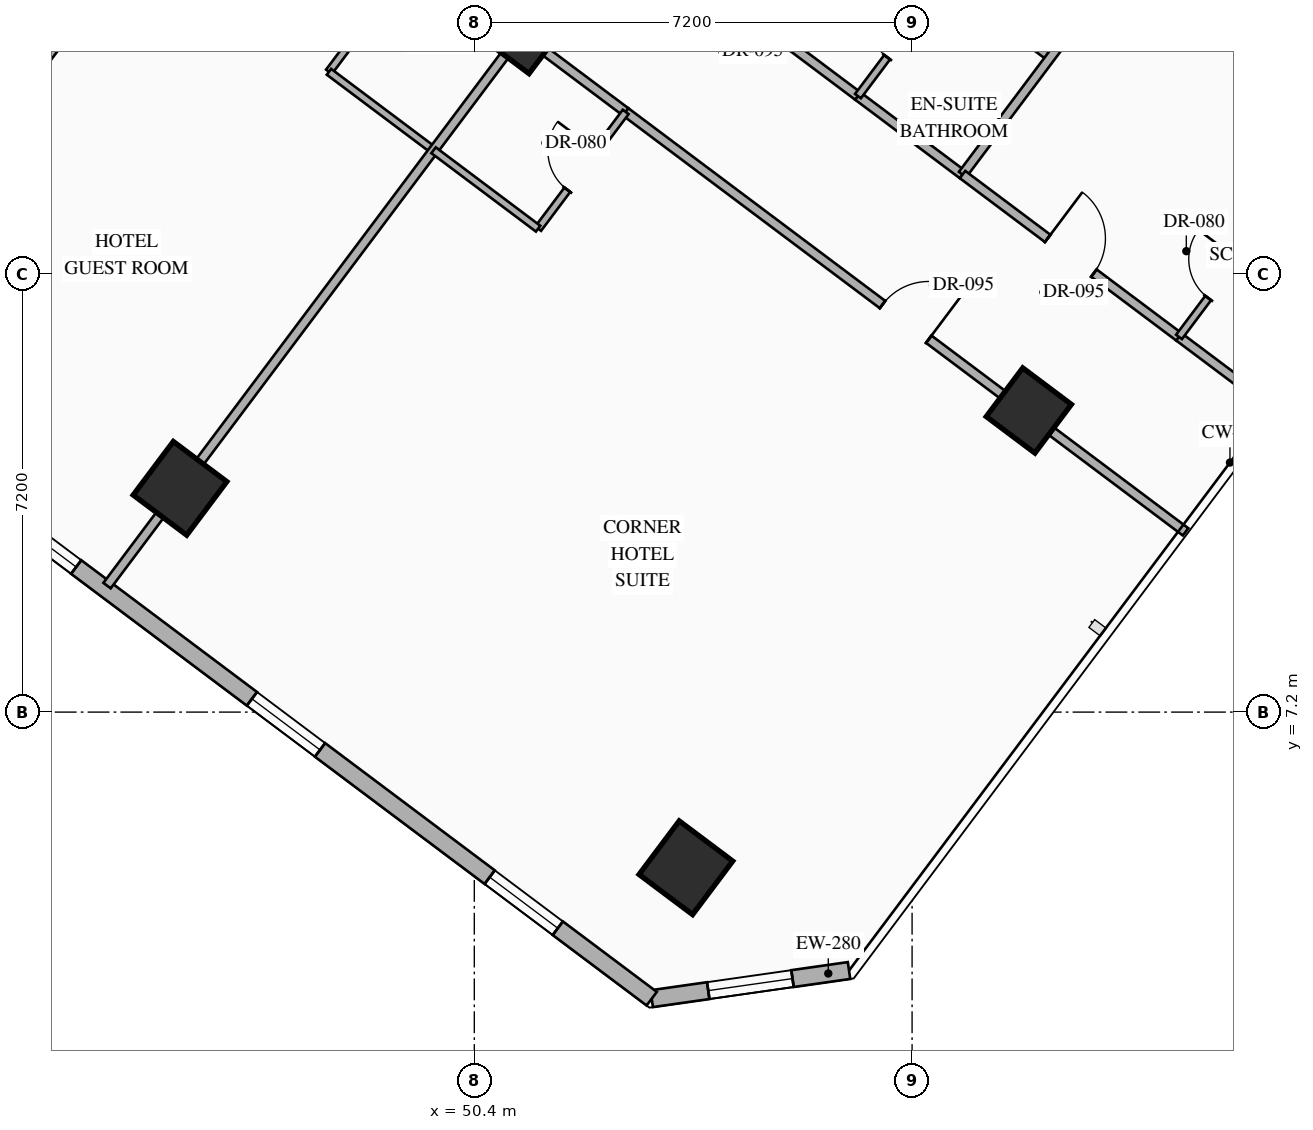
"""IFC4 building model, lengths in metres.
Left out: names, types, materials, properties, quantities, classifications, styles, units other than length and angle.
Written with IfcOpenShell. Run it as: python <this file> out.ifc"""

import sys

from ifc_helpers import new_model, si_unit, direction, frame, frame_2d, origin, origin_2d, place, context, subcontext, project, spatial, rectangle, hollow_rectangle, extrude, element, fill, save


model = new_model("IFC4")
c1 = context("Model", 3, precision=1e-05, world=origin(), true_north=direction((0.0, 1.0)))
c2 = subcontext(c1, "Body", "Model", "MODEL_VIEW")
j1 = project(units=[si_unit("LENGTHUNIT", "METRE"), si_unit("PLANEANGLEUNIT", "RADIAN")], contexts=[c1])
p1 = place(None, origin())
s1 = spatial("IfcSite", under=j1, at=p1, CompositionType="ELEMENT")
p2 = place(p1, origin())
s2 = spatial("IfcBuilding", under=s1, at=p2, CompositionType="ELEMENT")
p3 = place(p2, frame((0.0, 0.0, 39.95)))
s3 = spatial("IfcBuildingStorey", under=s2, at=p3, CompositionType="ELEMENT", Elevation=39.95)
p4 = place(p3, frame((45.56, 10.88, 0.0), z_axis=(0.0, 0.0, 1.0), x_axis=(0.799999996291, -0.600000004945, 0.0)))
e1 = element("IfcColumn", 1, at=p4, inside=s3, PredefinedType="COLUMN", context=c2, shape_type="SweptSolid", body=[
    extrude(hollow_rectangle(XDim=1.1, YDim=1.1, WallThickness=0.04, at=origin_2d()), origin(), (0.0, 0.0, 1.0), 3.35),
])
p5 = place(p3, frame((51.2, 18.4, 0.0), z_axis=(0.0, 0.0, 1.0), x_axis=(0.799999996291, -0.600000004945, 0.0)))
e2 = element("IfcColumn", 2, at=p5, inside=s3, PredefinedType="COLUMN", context=c2, shape_type="SweptSolid", body=[
    extrude(hollow_rectangle(XDim=1.0, YDim=1.0, WallThickness=0.038, at=origin_2d()), origin(), (0.0, 0.0, 1.0), 3.35),
])
p6 = place(p3, frame((53.88, 4.64, 0.0), z_axis=(0.0, 0.0, 1.0), x_axis=(0.799999996291, -0.600000004945, 0.0)))
e3 = element("IfcColumn", 3, at=p6, inside=s3, PredefinedType="COLUMN", context=c2, shape_type="SweptSolid", body=[
    extrude(hollow_rectangle(XDim=1.1, YDim=1.1, WallThickness=0.04, at=origin_2d()), origin(), (0.0, 0.0, 1.0), 3.35),
])
p7 = place(p3, frame((59.52, 12.16, 0.0), z_axis=(0.0, 0.0, 1.0), x_axis=(0.799999996291, -0.600000004945, 0.0)))
e4 = element("IfcColumn", 4, at=p7, inside=s3, PredefinedType="COLUMN", context=c2, shape_type="SweptSolid", body=[
    extrude(hollow_rectangle(XDim=1.0, YDim=1.0, WallThickness=0.038, at=origin_2d()), origin(), (0.0, 0.0, 1.0), 3.35),
])
p8 = place(p3, frame((56.563, 2.95, 0.0), z_axis=(0.0, 0.0, 1.0), x_axis=(-0.989977778067, -0.141223223777, 0.0)))
e5 = element("IfcWall", 5, at=p8, inside=s3, PredefinedType="STANDARD", context=c2, shape_type="SweptSolid", body=[
    extrude(rectangle(XDim=3.278, YDim=0.28, at=frame_2d((1.639, 0.0))), origin(), (0.0, 0.0, 1.0), 3.13),
])
p9 = place(p8, frame((0.939, 0.0, 0.85)))
e6 = element("IfcOpeningElement", 6, at=p9, cuts=e5, PredefinedType="OPENING", context=c2, shape_type="SweptSolid", body=[
    extrude(rectangle(XDim=1.4, YDim=1.8, at=frame_2d((0.7, 0.9))), frame((0.0, 0.15, 0.0), z_axis=(0.0, -1.0, 0.0), x_axis=(1.0, 0.0, 0.0)), (0.0, 0.0, 1.0), 0.3),
])
p10 = place(p3, frame((53.318, 2.487, 0.0), z_axis=(0.0, 0.0, 1.0), x_axis=(-0.800004174678, 0.599994433723, 0.0)))
e7 = element("IfcWall", 7, at=p10, inside=s3, PredefinedType="STANDARD", context=c2, shape_type="SweptSolid", body=[
    extrude(rectangle(XDim=35.089, YDim=0.28, at=frame_2d((17.544, 0.0))), origin(), (0.0, 0.0, 1.0), 3.13),
])
p11 = place(p10, frame((1.931, 0.0, 0.85)))
e8 = element("IfcOpeningElement", 8, at=p11, cuts=e7, PredefinedType="OPENING", context=c2, shape_type="SweptSolid", body=[
    extrude(rectangle(XDim=1.4, YDim=1.8, at=frame_2d((0.7, 0.9))), frame((0.0, 0.15, 0.0), z_axis=(0.0, -1.0, 0.0), x_axis=(1.0, 0.0, 0.0)), (0.0, 0.0, 1.0), 0.3),
])
p12 = place(p10, frame((6.819, 0.0, 0.85)))
e9 = element("IfcOpeningElement", 9, at=p12, cuts=e7, PredefinedType="OPENING", context=c2, shape_type="SweptSolid", body=[
    extrude(rectangle(XDim=1.4, YDim=1.8, at=frame_2d((0.7, 0.9))), frame((0.0, 0.15, 0.0), z_axis=(0.0, -1.0, 0.0), x_axis=(1.0, 0.0, 0.0)), (0.0, 0.0, 1.0), 0.3),
])
p13 = place(p10, frame((11.832, 0.0, 0.85)))
e10 = element("IfcOpeningElement", 10, at=p13, cuts=e7, PredefinedType="OPENING", context=c2, shape_type="SweptSolid", body=[
    extrude(rectangle(XDim=1.4, YDim=1.8, at=frame_2d((0.7, 0.9))), frame((0.0, 0.15, 0.0), z_axis=(0.0, -1.0, 0.0), x_axis=(1.0, 0.0, 0.0)), (0.0, 0.0, 1.0), 0.3),
])
p14 = place(p10, frame((17.647, 0.0, 0.85)))
e11 = element("IfcOpeningElement", 11, at=p14, cuts=e7, PredefinedType="OPENING", context=c2, shape_type="SweptSolid", body=[
    extrude(rectangle(XDim=1.4, YDim=1.8, at=frame_2d((0.7, 0.9))), frame((0.0, 0.15, 0.0), z_axis=(0.0, -1.0, 0.0), x_axis=(1.0, 0.0, 0.0)), (0.0, 0.0, 1.0), 0.3),
])
p15 = place(p10, frame((21.857, 0.0, 0.85)))
e12 = element("IfcOpeningElement", 12, at=p15, cuts=e7, PredefinedType="OPENING", context=c2, shape_type="SweptSolid", body=[
    extrude(rectangle(XDim=1.4, YDim=1.8, at=frame_2d((0.7, 0.9))), frame((0.0, 0.15, 0.0), z_axis=(0.0, -1.0, 0.0), x_axis=(1.0, 0.0, 0.0)), (0.0, 0.0, 1.0), 0.3),
])
p16 = place(p10, frame((26.87, 0.0, 0.85)))
e13 = element("IfcOpeningElement", 13, at=p16, cuts=e7, PredefinedType="OPENING", context=c2, shape_type="SweptSolid", body=[
    extrude(rectangle(XDim=1.4, YDim=1.8, at=frame_2d((0.7, 0.9))), frame((0.0, 0.15, 0.0), z_axis=(0.0, -1.0, 0.0), x_axis=(1.0, 0.0, 0.0)), (0.0, 0.0, 1.0), 0.3),
])
p17 = place(p10, frame((31.757, 0.0, 0.85)))
e14 = element("IfcOpeningElement", 14, at=p17, cuts=e7, PredefinedType="OPENING", context=c2, shape_type="SweptSolid", body=[
    extrude(rectangle(XDim=1.4, YDim=1.8, at=frame_2d((0.7, 0.9))), frame((0.0, 0.15, 0.0), z_axis=(0.0, -1.0, 0.0), x_axis=(1.0, 0.0, 0.0)), (0.0, 0.0, 1.0), 0.3),
])
p18 = place(p3, frame((39.464, 12.752, 0.0), z_axis=(0.0, 0.0, 1.0), x_axis=(0.6, 0.8, 0.0)))
e15 = element("IfcWall", 15, at=p18, inside=s3, PredefinedType="PARTITIONING", context=c2, shape_type="SweptSolid", body=[
    extrude(rectangle(XDim=11.51, YDim=0.15, at=frame_2d((5.755, 0.0))), origin(), (0.0, 0.0, 1.0), 3.13),
])
p19 = place(p3, frame((53.15, 20.0, 0.0), z_axis=(0.0, 0.0, 1.0), x_axis=(0.800013166942, -0.599982443676, 0.0)))
e16 = element("IfcWall", 16, at=p19, inside=s3, PredefinedType="PARTITIONING", context=c2, shape_type="SweptSolid", body=[
    extrude(rectangle(XDim=4.45, YDim=0.15, at=frame_2d((2.225, 0.0))), origin(), (0.0, 0.0, 1.0), 2.775),
])
p20 = place(p19, frame((1.75, 0.0, 0.0)))
e17 = element("IfcOpeningElement", 17, at=p20, cuts=e16, PredefinedType="OPENING", context=c2, shape_type="SweptSolid", body=[
    extrude(rectangle(XDim=0.95, YDim=2.15, at=frame_2d((0.475, 1.075))), frame((0.0, 0.085, 0.0), z_axis=(0.0, -1.0, 0.0), x_axis=(1.0, 0.0, 0.0)), (0.0, 0.0, 1.0), 0.17),
])
p21 = place(p3, frame((56.71, 17.33, 0.0), z_axis=(0.0, 0.0, 1.0), x_axis=(0.79998637334, -0.60001816845, 0.0)))
e18 = element("IfcWall", 18, at=p21, inside=s3, PredefinedType="PARTITIONING", context=c2, shape_type="SweptSolid", body=[
    extrude(rectangle(XDim=2.15, YDim=0.15, at=frame_2d((1.075, 0.0))), origin(), (0.0, 0.0, 1.0), 2.775),
])
p22 = place(p3, frame((56.71, 17.33, 0.0), z_axis=(0.0, 0.0, 1.0), x_axis=(0.6, 0.8, 0.0)))
e19 = element("IfcWall", 19, at=p22, inside=s3, PredefinedType="PARTITIONING", context=c2, shape_type="SweptSolid", body=[
    extrude(rectangle(XDim=2.4, YDim=0.12, at=frame_2d((1.2, 0.0))), origin(), (0.0, 0.0, 1.0), 3.13),
])
p23 = place(p22, frame((0.8, 0.0, 0.0)))
e20 = element("IfcOpeningElement", 20, at=p23, cuts=e19, PredefinedType="OPENING", context=c2, shape_type="SweptSolid", body=[
    extrude(rectangle(XDim=0.8, YDim=2.06, at=frame_2d((0.4, 1.03))), frame((0.0, 0.07, 0.0), z_axis=(0.0, -1.0, 0.0), x_axis=(1.0, 0.0, 0.0)), (0.0, 0.0, 1.0), 0.14),
])
p24 = place(p3, frame((58.15, 19.25, 0.0), z_axis=(0.0, 0.0, 1.0), x_axis=(0.800027249606, -0.599963665473, 0.0)))
e21 = element("IfcWall", 21, at=p24, inside=s3, PredefinedType="PARTITIONING", context=c2, shape_type="SweptSolid", body=[
    extrude(rectangle(XDim=2.15, YDim=0.12, at=frame_2d((1.075, 0.0))), origin(), (0.0, 0.0, 1.0), 3.13),
])
p25 = place(p3, frame((58.43, 16.04, 0.0), z_axis=(0.0, 0.0, 1.0), x_axis=(0.60001014597, 0.799992390422, 0.0)))
e22 = element("IfcWall", 22, at=p25, inside=s3, PredefinedType="PARTITIONING", context=c2, shape_type="SweptSolid", body=[
    extrude(rectangle(XDim=11.55, YDim=0.15, at=frame_2d((5.775, 0.0))), origin(), (0.0, 0.0, 1.0), 3.13),
])
p26 = place(p3, frame((58.43, 16.04, 0.0), z_axis=(0.0, 0.0, 1.0), x_axis=(0.800013166942, -0.599982443676, 0.0)))
e23 = element("IfcWall", 23, at=p26, inside=s3, PredefinedType="PARTITIONING", context=c2, shape_type="SweptSolid", body=[
    extrude(rectangle(XDim=4.45, YDim=0.15, at=frame_2d((2.225, 0.0))), origin(), (0.0, 0.0, 1.0), 2.775),
])
p27 = place(p26, frame((1.75, 0.0, 0.0)))
e24 = element("IfcOpeningElement", 24, at=p27, cuts=e23, PredefinedType="OPENING", context=c2, shape_type="SweptSolid", body=[
    extrude(rectangle(XDim=0.95, YDim=2.15, at=frame_2d((0.475, 1.075))), frame((0.0, 0.085, 0.0), z_axis=(0.0, -1.0, 0.0), x_axis=(1.0, 0.0, 0.0)), (0.0, 0.0, 1.0), 0.17),
])
p28 = place(p3, frame((61.99, 13.37, 0.0), z_axis=(0.0, 0.0, 1.0), x_axis=(0.79997084737, -0.600038868206, 0.0)))
e25 = element("IfcWall", 25, at=p28, inside=s3, PredefinedType="PARTITIONING", context=c2, shape_type="SweptSolid", body=[
    extrude(rectangle(XDim=2.01, YDim=0.15, at=frame_2d((1.005, 0.0))), origin(), (0.0, 0.0, 1.0), 3.13),
])
p29 = place(p3, frame((61.99, 13.37, 0.0), z_axis=(0.0, 0.0, 1.0), x_axis=(0.6, 0.8, 0.0)))
e26 = element("IfcWall", 26, at=p29, inside=s3, PredefinedType="PARTITIONING", context=c2, shape_type="SweptSolid", body=[
    extrude(rectangle(XDim=2.4, YDim=0.12, at=frame_2d((1.2, 0.0))), origin(), (0.0, 0.0, 1.0), 3.13),
])
p30 = place(p29, frame((0.8, 0.0, 0.0)))
e27 = element("IfcOpeningElement", 27, at=p30, cuts=e26, PredefinedType="OPENING", context=c2, shape_type="SweptSolid", body=[
    extrude(rectangle(XDim=0.8, YDim=2.06, at=frame_2d((0.4, 1.03))), frame((0.0, 0.07, 0.0), z_axis=(0.0, -1.0, 0.0), x_axis=(1.0, 0.0, 0.0)), (0.0, 0.0, 1.0), 0.14),
])
p31 = place(p3, frame((48.01, 17.73, 0.0), z_axis=(0.0, 0.0, 1.0), x_axis=(0.6, 0.8, 0.0)))
e28 = element("IfcWall", 28, at=p31, inside=s3, PredefinedType="PARTITIONING", context=c2, shape_type="SweptSolid", body=[
    extrude(rectangle(XDim=2.4, YDim=0.12, at=frame_2d((1.2, 0.0))), origin(), (0.0, 0.0, 1.0), 3.13),
])
p32 = place(p31, frame((0.8, 0.0, 0.0)))
e29 = element("IfcOpeningElement", 29, at=p32, cuts=e28, PredefinedType="OPENING", context=c2, shape_type="SweptSolid", body=[
    extrude(rectangle(XDim=0.8, YDim=2.06, at=frame_2d((0.4, 1.03))), frame((0.0, 0.07, 0.0), z_axis=(0.0, -1.0, 0.0), x_axis=(1.0, 0.0, 0.0)), (0.0, 0.0, 1.0), 0.14),
])
p33 = place(p3, frame((48.01, 17.73, 0.0), z_axis=(0.0, 0.0, 1.0), x_axis=(0.79998637334, -0.60001816845, 0.0)))
e30 = element("IfcWall", 30, at=p33, inside=s3, PredefinedType="PARTITIONING", context=c2, shape_type="SweptSolid", body=[
    extrude(rectangle(XDim=2.15, YDim=0.12, at=frame_2d((1.075, 0.0))), origin(), (0.0, 0.0, 1.0), 3.13),
])
p34 = place(p3, frame((44.36, 9.28, 0.0), z_axis=(0.0, 0.0, 1.0), x_axis=(0.599986233332, 0.800010324816, 0.0)))
e31 = element("IfcWall", 31, at=p34, inside=s3, PredefinedType="PARTITIONING", context=c2, shape_type="SweptSolid", body=[
    extrude(rectangle(XDim=11.35, YDim=0.15, at=frame_2d((5.675, 0.0))), origin(), (0.0, 0.0, 1.0), 2.425),
])
p35 = place(p3, frame((51.17, 18.36, 0.0), z_axis=(0.0, 0.0, 1.0), x_axis=(0.79998637334, -0.60001816845, 0.0)))
e32 = element("IfcWall", 32, at=p35, inside=s3, PredefinedType="PARTITIONING", context=c2, shape_type="SweptSolid", body=[
    extrude(rectangle(XDim=2.15, YDim=0.15, at=frame_2d((1.075, 0.0))), origin(), (0.0, 0.0, 1.0), 2.425),
])
p36 = place(p3, frame((52.89, 17.07, 0.0), z_axis=(0.0, 0.0, 1.0), x_axis=(0.8, -0.6, 0.0)))
e33 = element("IfcWall", 33, at=p36, inside=s3, PredefinedType="PARTITIONING", context=c2, shape_type="SweptSolid", body=[
    extrude(rectangle(XDim=11.51, YDim=0.15, at=frame_2d((5.755, 0.0))), origin(), (0.0, 0.0, 1.0), 2.425),
])
p37 = place(p36, frame((5.28, 0.0, 0.0)))
e34 = element("IfcOpeningElement", 34, at=p37, cuts=e33, PredefinedType="OPENING", context=c2, shape_type="SweptSolid", body=[
    extrude(rectangle(XDim=0.95, YDim=2.15, at=frame_2d((0.475, 1.075))), frame((0.0, 0.085, 0.0), z_axis=(0.0, -1.0, 0.0), x_axis=(1.0, 0.0, 0.0)), (0.0, 0.0, 1.0), 0.17),
])
p38 = place(p3, frame((51.45, 15.15, 0.0), z_axis=(0.0, 0.0, 1.0), x_axis=(0.599951172744, 0.800036618114, 0.0)))
e35 = element("IfcWall", 35, at=p38, inside=s3, PredefinedType="PARTITIONING", context=c2, shape_type="SweptSolid", body=[
    extrude(rectangle(XDim=2.4, YDim=0.12, at=frame_2d((1.2, 0.0))), origin(), (0.0, 0.0, 1.0), 3.13),
])
p39 = place(p38, frame((0.8, 0.0, 0.0)))
e36 = element("IfcOpeningElement", 36, at=p39, cuts=e35, PredefinedType="OPENING", context=c2, shape_type="SweptSolid", body=[
    extrude(rectangle(XDim=0.8, YDim=2.06, at=frame_2d((0.4, 1.03))), frame((0.0, 0.07, 0.0), z_axis=(0.0, -1.0, 0.0), x_axis=(1.0, 0.0, 0.0)), (0.0, 0.0, 1.0), 0.14),
])
p40 = place(p3, frame((49.73, 16.44, 0.0), z_axis=(0.0, 0.0, 1.0), x_axis=(0.79998637334, -0.60001816845, 0.0)))
e37 = element("IfcWall", 37, at=p40, inside=s3, PredefinedType="PARTITIONING", context=c2, shape_type="SweptSolid", body=[
    extrude(rectangle(XDim=2.15, YDim=0.12, at=frame_2d((1.075, 0.0))), origin(), (0.0, 0.0, 1.0), 3.13),
])
p41 = place(p9, origin())
e38 = element("IfcWindow", 38, at=p41, inside=s3, PartitioningType="SINGLE_PANEL", PredefinedType="WINDOW", context=c2, shape_type="SweptSolid", body=[
    extrude(rectangle(XDim=1.4, YDim=1.8, at=frame_2d((0.7, 0.9))), frame((0.0, 0.03, 0.0), z_axis=(0.0, -1.0, 0.0), x_axis=(1.0, 0.0, 0.0)), (0.0, 0.0, 1.0), 0.06),
])
fill(e6, e38)
p42 = place(p11, origin())
e39 = element("IfcWindow", 39, at=p42, inside=s3, PartitioningType="SINGLE_PANEL", PredefinedType="WINDOW", context=c2, shape_type="SweptSolid", body=[
    extrude(rectangle(XDim=1.4, YDim=1.8, at=frame_2d((0.7, 0.9))), frame((0.0, 0.03, 0.0), z_axis=(0.0, -1.0, 0.0), x_axis=(1.0, 0.0, 0.0)), (0.0, 0.0, 1.0), 0.06),
])
fill(e8, e39)
p43 = place(p12, origin())
e40 = element("IfcWindow", 40, at=p43, inside=s3, PartitioningType="SINGLE_PANEL", PredefinedType="WINDOW", context=c2, shape_type="SweptSolid", body=[
    extrude(rectangle(XDim=1.4, YDim=1.8, at=frame_2d((0.7, 0.9))), frame((0.0, 0.03, 0.0), z_axis=(0.0, -1.0, 0.0), x_axis=(1.0, 0.0, 0.0)), (0.0, 0.0, 1.0), 0.06),
])
fill(e9, e40)
p44 = place(p13, origin())
e41 = element("IfcWindow", 41, at=p44, inside=s3, PartitioningType="SINGLE_PANEL", PredefinedType="WINDOW", context=c2, shape_type="SweptSolid", body=[
    extrude(rectangle(XDim=1.4, YDim=1.8, at=frame_2d((0.7, 0.9))), frame((0.0, 0.03, 0.0), z_axis=(0.0, -1.0, 0.0), x_axis=(1.0, 0.0, 0.0)), (0.0, 0.0, 1.0), 0.06),
])
fill(e10, e41)
p45 = place(p23, origin())
e42 = element("IfcDoor", 42, at=p45, inside=s3, OperationType="SINGLE_SWING_RIGHT", PredefinedType="DOOR", context=c2, shape_type="SweptSolid", body=[
    extrude(rectangle(XDim=0.8, YDim=2.06, at=frame_2d((0.4, 1.03))), frame((0.0, 0.025, 0.0), z_axis=(0.0, -1.0, 0.0), x_axis=(1.0, 0.0, 0.0)), (0.0, 0.0, 1.0), 0.05),
])
fill(e20, e42)
p46 = place(p27, origin())
e43 = element("IfcDoor", 43, at=p46, inside=s3, OperationType="SINGLE_SWING_LEFT", PredefinedType="DOOR", context=c2, shape_type="SweptSolid", body=[
    extrude(rectangle(XDim=0.95, YDim=2.15, at=frame_2d((0.475, 1.075))), frame((0.0, 0.025, 0.0), z_axis=(0.0, -1.0, 0.0), x_axis=(1.0, 0.0, 0.0)), (0.0, 0.0, 1.0), 0.05),
])
fill(e24, e43)
p47 = place(p30, origin())
e44 = element("IfcDoor", 44, at=p47, inside=s3, OperationType="SINGLE_SWING_RIGHT", PredefinedType="DOOR", context=c2, shape_type="SweptSolid", body=[
    extrude(rectangle(XDim=0.8, YDim=2.06, at=frame_2d((0.4, 1.03))), frame((0.0, 0.025, 0.0), z_axis=(0.0, -1.0, 0.0), x_axis=(1.0, 0.0, 0.0)), (0.0, 0.0, 1.0), 0.05),
])
fill(e27, e44)
p48 = place(p37, origin())
e45 = element("IfcDoor", 45, at=p48, inside=s3, OperationType="SINGLE_SWING_RIGHT", PredefinedType="DOOR", context=c2, shape_type="SweptSolid", body=[
    extrude(rectangle(XDim=0.95, YDim=2.15, at=frame_2d((0.475, 1.075))), frame((0.0, 0.025, 0.0), z_axis=(0.0, -1.0, 0.0), x_axis=(1.0, 0.0, 0.0)), (0.0, 0.0, 1.0), 0.05),
])
fill(e34, e45)
p49 = place(p39, origin())
e46 = element("IfcDoor", 46, at=p49, inside=s3, OperationType="SINGLE_SWING_RIGHT", PredefinedType="DOOR", context=c2, shape_type="SweptSolid", body=[
    extrude(rectangle(XDim=0.8, YDim=2.06, at=frame_2d((0.4, 1.03))), frame((0.0, 0.025, 0.0), z_axis=(0.0, -1.0, 0.0), x_axis=(1.0, 0.0, 0.0)), (0.0, 0.0, 1.0), 0.05),
])
fill(e36, e46)
save(model, sys.argv[1])
